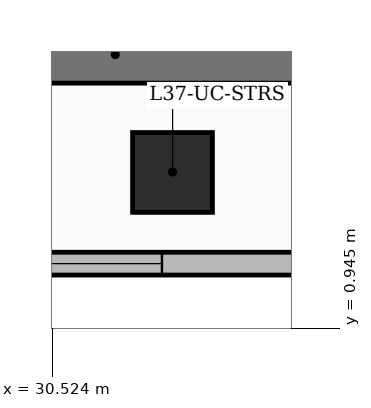
"""IFC4 building model, lengths in metres.
Left out: names, types, materials, properties, quantities, classifications, styles, units other than length and angle.
Written with IfcOpenShell. Run it as: python <this file> out.ifc"""

import sys

from ifc_helpers import new_model, si_unit, direction, frame, frame_2d, origin, origin_2d, place, context, subcontext, project, spatial, rectangle, extrude, element, fill, save


model = new_model("IFC4")
c1 = context("Model", 3, precision=1e-05, world=origin(), true_north=direction((0.0, 1.0)))
c2 = subcontext(c1, "Body", "Model", "MODEL_VIEW")
j1 = project(units=[si_unit("LENGTHUNIT", "METRE"), si_unit("PLANEANGLEUNIT", "RADIAN")], contexts=[c1])
p1 = place(None, origin())
s1 = spatial("IfcSite", under=j1, at=p1, CompositionType="ELEMENT")
p2 = place(p1, origin())
s2 = spatial("IfcBuilding", under=s1, at=p2, CompositionType="ELEMENT")
p3 = place(p2, frame((0.0, 0.0, 146.4)))
s3 = spatial("IfcBuildingStorey", under=s2, at=p3, CompositionType="ELEMENT", Elevation=146.4)
p4 = place(p3, frame((28.15, 4.55, 0.0), z_axis=(0.0, 0.0, 1.0), x_axis=(1.0, 0.0, 0.0)))
e1 = element("IfcWall", 1, at=p4, inside=s3, PredefinedType="SHEAR", context=c2, shape_type="SweptSolid", body=[
    extrude(rectangle(XDim=6.4, YDim=0.75, at=frame_2d((3.2, 0.0))), origin(), (0.0, 0.0, 1.0), 3.6),
])
p5 = place(p3, frame((32.104, 3.0, 0.0), z_axis=(0.0, 0.0, 1.0), x_axis=(1.0, 0.0, 0.0)))
e2 = element("IfcColumn", 2, at=p5, inside=s3, PredefinedType="COLUMN", context=c2, shape_type="SweptSolid", body=[
    extrude(rectangle(XDim=1.05, YDim=1.05, at=origin_2d()), origin(), (0.0, 0.0, 1.0), 3.6),
])
p6 = place(p3, frame((34.16, 1.8, 0.0), z_axis=(0.0, 0.0, 1.0), x_axis=(-1.0, 0.0, 0.0)))
e3 = element("IfcWall", 3, at=p6, inside=s3, PredefinedType="SOLIDWALL", context=c2, shape_type="SweptSolid", body=[
    extrude(rectangle(XDim=6.38, YDim=0.3, at=frame_2d((3.19, 0.0))), origin(), (0.0, 0.0, 1.0), 3.35),
])
p7 = place(p6, frame((2.195, 0.0, 0.55)))
e4 = element("IfcOpeningElement", 4, at=p7, cuts=e3, PredefinedType="OPENING", context=c2, shape_type="SweptSolid", body=[
    extrude(rectangle(XDim=1.6, YDim=2.2, at=frame_2d((0.8, 1.1))), frame((0.0, 0.16, 0.0), z_axis=(0.0, -1.0, 0.0), x_axis=(1.0, 0.0, 0.0)), (0.0, 0.0, 1.0), 0.32),
])
p8 = place(p7, origin())
e5 = element("IfcWindow", 5, at=p8, inside=s3, PartitioningType="SINGLE_PANEL", PredefinedType="WINDOW", context=c2, shape_type="SweptSolid", body=[
    extrude(rectangle(XDim=1.6, YDim=2.2, at=frame_2d((0.8, 1.1))), frame((0.0, 0.03, 0.0), z_axis=(0.0, -1.0, 0.0), x_axis=(1.0, 0.0, 0.0)), (0.0, 0.0, 1.0), 0.06),
])
fill(e4, e5)
save(model, sys.argv[1])
